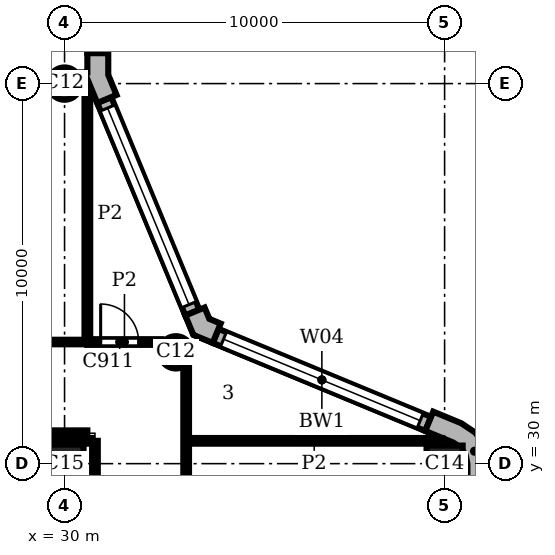
"""IFC4 building model, lengths in metres.
Left out: names, types, materials, properties, quantities, classifications, styles, units other than length and angle.
Written with IfcOpenShell. Run it as: python <this file> out.ifc"""

import sys

from ifc_helpers import new_model, si_unit, direction, frame, frame_2d, origin, origin_2d, place, context, subcontext, project, spatial, polyline, rectangle, circle, outline, extrude, element, fill, save


model = new_model("IFC4")
c1 = context("Model", 3, precision=1e-05, world=origin(), true_north=direction((0.0, 1.0)))
c2 = subcontext(c1, "Body", "Model", "MODEL_VIEW")
j1 = project(units=[si_unit("LENGTHUNIT", "METRE"), si_unit("PLANEANGLEUNIT", "RADIAN")], contexts=[c1])
p1 = place(None, origin())
s1 = spatial("IfcSite", under=j1, at=p1, CompositionType="ELEMENT")
p2 = place(p1, origin())
s2 = spatial("IfcBuilding", under=s1, at=p2, CompositionType="ELEMENT")
p3 = place(p2, frame((0.0, 0.0, 333.3)))
s3 = spatial("IfcBuildingStorey", under=s2, at=p3, CompositionType="ELEMENT", Elevation=333.3)
p4 = place(p3, frame((40.0, 30.0, 0.0), z_axis=(0.0, 0.0, 1.0), x_axis=(1.0, 0.0, 0.0)))
e1 = element("IfcColumn", 1, at=p4, inside=s3, PredefinedType="COLUMN", context=c2, shape_type="SweptSolid", body=[
    extrude(rectangle(XDim=0.95, YDim=0.95, at=origin_2d()), origin(), (0.0, 0.0, 1.0), 3.9),
])
for number, where, z_axis, x_axis in (
    (2, (32.929, 32.929, 0.0), (0.0, 0.0, 1.0), (1.0, 0.0, 0.0)),
    (3, (30.0, 40.0, 0.0), (0.0, 0.0, 1.0), (1.0, 0.0, 0.0)),
):
    element("IfcColumn", number, at=place(p3, frame(where, z_axis=z_axis, x_axis=x_axis)), inside=s3, PredefinedType="COLUMN", context=c2, shape_type="SweptSolid", body=[
        extrude(circle(Radius=0.425, at=origin_2d()), origin(), (0.0, 0.0, 1.0), 3.9),
    ])
p5 = place(p3, frame((30.0, 30.0, 0.0), z_axis=(0.0, 0.0, 1.0), x_axis=(1.0, 0.0, 0.0)))
e4 = element("IfcColumn", 4, at=p5, inside=s3, PredefinedType="COLUMN", context=c2, shape_type="SweptSolid", body=[
    extrude(rectangle(XDim=1.0, YDim=1.0, at=origin_2d()), origin(), (0.0, 0.0, 1.0), 3.9),
])
p6 = place(p3, origin())
e5 = element("IfcWall", 5, at=p6, inside=s3, PredefinedType="SOLIDWALL", context=c2, shape_type="SweptSolid", body=[
    extrude(outline(polyline([(41.0, 29.2), (41.15, 29.2), (41.15, 30.0), (41.062, 30.44), (40.813, 30.813), (40.44, 31.062), (39.701, 31.369), (39.644, 31.23), (39.49, 30.861), (40.229, 30.554), (40.424, 30.424), (40.554, 30.229), (40.6, 30.0), (40.6, 29.2), (41.0, 29.2)])), origin(), (0.0, 0.0, 1.0), 3.9),
])
e6 = element("IfcWall", 6, at=p6, inside=s3, PredefinedType="SOLIDWALL", context=c2, shape_type="SweptSolid", body=[
    extrude(outline(polyline([(34.051, 33.547), (34.108, 33.685), (33.809, 33.809), (33.685, 34.108), (33.547, 34.051), (33.177, 33.898), (33.388, 33.388), (33.898, 33.177), (34.051, 33.547)])), origin(), (0.0, 0.0, 1.0), 3.9),
])
e7 = element("IfcWall", 7, at=p6, inside=s3, PredefinedType="SOLIDWALL", context=c2, shape_type="SweptSolid", body=[
    extrude(outline(polyline([(30.62, 39.995), (30.62, 40.071), (30.861, 39.49), (31.23, 39.644), (31.369, 39.701), (31.15, 40.229), (31.15, 40.8), (31.0, 40.8), (30.6, 40.8), (30.6, 40.295), (30.425, 40.295), (30.425, 39.995), (30.62, 39.995)])), origin(), (0.0, 0.0, 1.0), 3.9),
])
p7 = place(p3, frame((39.567, 31.045, 0.0), z_axis=(0.0, 0.0, 1.0), x_axis=(-0.923891000409, 0.382655745237, 0.0)))
e8 = element("IfcWall", 8, at=p7, inside=s3, PredefinedType="SOLIDWALL", context=c2, shape_type="SweptSolid", body=[
    extrude(rectangle(XDim=6.053, YDim=0.4, at=frame_2d((3.027, 0.0))), origin(), (0.0, 0.0, 1.0), 3.9),
])
p8 = place(p7, frame((0.227, 0.0, 0.9)))
e9 = element("IfcOpeningElement", 9, at=p8, cuts=e8, PredefinedType="OPENING", context=c2, shape_type="SweptSolid", body=[
    extrude(rectangle(XDim=5.6, YDim=2.35, at=frame_2d((2.8, 1.175))), frame((0.0, 0.21, 0.0), z_axis=(0.0, -1.0, 0.0), x_axis=(1.0, 0.0, 0.0)), (0.0, 0.0, 1.0), 0.42),
])
p9 = place(p3, frame((33.362, 33.974, 0.0), z_axis=(0.0, 0.0, 1.0), x_axis=(-0.382655745237, 0.923891000409, 0.0)))
e10 = element("IfcWall", 10, at=p9, inside=s3, PredefinedType="SOLIDWALL", context=c2, shape_type="SweptSolid", body=[
    extrude(rectangle(XDim=6.053, YDim=0.4, at=frame_2d((3.027, 0.0))), origin(), (0.0, 0.0, 1.0), 3.9),
])
p10 = place(p9, frame((0.227, 0.0, 0.9)))
e11 = element("IfcOpeningElement", 11, at=p10, cuts=e10, PredefinedType="OPENING", context=c2, shape_type="SweptSolid", body=[
    extrude(rectangle(XDim=5.6, YDim=2.35, at=frame_2d((2.8, 1.175))), frame((0.0, 0.21, 0.0), z_axis=(0.0, -1.0, 0.0), x_axis=(1.0, 0.0, 0.0)), (0.0, 0.0, 1.0), 0.42),
])
p11 = place(p3, frame((30.8, 40.8, 0.0), z_axis=(0.0, 0.0, 1.0), x_axis=(0.0, 1.0, 0.0)))
e12 = element("IfcWall", 12, at=p11, inside=s3, PredefinedType="SOLIDWALL", context=c2, shape_type="SweptSolid", body=[
    extrude(rectangle(XDim=18.4, YDim=0.4, at=frame_2d((9.2, 0.0))), origin(), (0.0, 0.0, 1.0), 3.9),
])
p12 = place(p11, frame((0.2, 0.0, 0.9)))
e13 = element("IfcOpeningElement", 13, at=p12, cuts=e12, PredefinedType="OPENING", context=c2, shape_type="SweptSolid", body=[
    extrude(rectangle(XDim=8.0, YDim=2.35, at=frame_2d((4.0, 1.175))), frame((0.0, 0.21, 0.0), z_axis=(0.0, -1.0, 0.0), x_axis=(1.0, 0.0, 0.0)), (0.0, 0.0, 1.0), 0.42),
])
p13 = place(p11, frame((10.2, 0.0, 0.9)))
e14 = element("IfcOpeningElement", 14, at=p13, cuts=e12, PredefinedType="OPENING", context=c2, shape_type="SweptSolid", body=[
    extrude(rectangle(XDim=8.0, YDim=2.35, at=frame_2d((4.0, 1.175))), frame((0.0, 0.21, 0.0), z_axis=(0.0, -1.0, 0.0), x_axis=(1.0, 0.0, 0.0)), (0.0, 0.0, 1.0), 0.42),
])
p14 = place(p3, frame((30.6, 33.2, 0.0), z_axis=(0.0, 0.0, 1.0), x_axis=(0.0, 1.0, 0.0)))
e15 = element("IfcWall", 15, at=p14, inside=s3, PredefinedType="PARTITIONING", context=c2, shape_type="SweptSolid", body=[
    extrude(rectangle(XDim=6.738, YDim=0.15, at=frame_2d((3.369, 0.0))), origin(), (0.0, 0.0, 1.0), 3.58),
])
p15 = place(p3, frame((30.8, 15.45, 0.0), z_axis=(0.0, 0.0, 1.0), x_axis=(0.0, 1.0, 0.0)))
e16 = element("IfcWall", 16, at=p15, inside=s3, PredefinedType="PARTITIONING", context=c2, shape_type="SweptSolid", body=[
    extrude(rectangle(XDim=15.15, YDim=0.15, at=frame_2d((7.575, 0.0))), origin(), (0.0, 0.0, 1.0), 3.58),
])
p16 = place(p15, frame((2.35, 0.0, 0.0)))
e17 = element("IfcOpeningElement", 17, at=p16, cuts=e16, PredefinedType="OPENING", context=c2, shape_type="SweptSolid", body=[
    extrude(rectangle(XDim=1.0, YDim=2.1, at=frame_2d((0.5, 1.05))), frame((0.0, 0.085, 0.0), z_axis=(0.0, -1.0, 0.0), x_axis=(1.0, 0.0, 0.0)), (0.0, 0.0, 1.0), 0.17),
])
p17 = place(p15, frame((10.35, 0.0, 0.0)))
e18 = element("IfcOpeningElement", 18, at=p17, cuts=e16, PredefinedType="OPENING", context=c2, shape_type="SweptSolid", body=[
    extrude(rectangle(XDim=1.0, YDim=2.1, at=frame_2d((0.5, 1.05))), frame((0.0, 0.085, 0.0), z_axis=(0.0, -1.0, 0.0), x_axis=(1.0, 0.0, 0.0)), (0.0, 0.0, 1.0), 0.17),
])
p18 = place(p3, frame((33.2, 8.0, 0.0), z_axis=(0.0, 0.0, 1.0), x_axis=(0.0, 1.0, 0.0)))
e19 = element("IfcWall", 19, at=p18, inside=s3, PredefinedType="PARTITIONING", context=c2, shape_type="SweptSolid", body=[
    extrude(rectangle(XDim=24.552, YDim=0.15, at=frame_2d((12.276, 0.0))), origin(), (0.0, 0.0, 1.0), 3.58),
])
p19 = place(p3, frame((28.002, 30.6, 0.0), z_axis=(0.0, 0.0, 1.0), x_axis=(1.0, 0.0, 0.0)))
e20 = element("IfcWall", 20, at=p19, inside=s3, PredefinedType="PARTITIONING", context=c2, shape_type="SweptSolid", body=[
    extrude(rectangle(XDim=2.723, YDim=0.15, at=frame_2d((1.362, 0.0))), origin(), (0.0, 0.0, 1.0), 3.58),
])
p20 = place(p3, frame((33.2, 30.6, 0.0), z_axis=(0.0, 0.0, 1.0), x_axis=(1.0, 0.0, 0.0)))
e21 = element("IfcWall", 21, at=p20, inside=s3, PredefinedType="PARTITIONING", context=c2, shape_type="SweptSolid", body=[
    extrude(rectangle(XDim=6.738, YDim=0.15, at=frame_2d((3.369, 0.0))), origin(), (0.0, 0.0, 1.0), 3.58),
])
p21 = place(p3, frame((13.802, 30.8, 0.0), z_axis=(0.0, 0.0, 1.0), x_axis=(1.0, 0.0, 0.0)))
e22 = element("IfcWall", 22, at=p21, inside=s3, PredefinedType="PARTITIONING", context=c2, shape_type="SweptSolid", body=[
    extrude(rectangle(XDim=16.798, YDim=0.15, at=frame_2d((8.399, 0.0))), origin(), (0.0, 0.0, 1.0), 3.58),
])
p22 = place(p21, frame((7.85, 0.0, 0.0)))
e23 = element("IfcOpeningElement", 23, at=p22, cuts=e22, PredefinedType="OPENING", context=c2, shape_type="SweptSolid", body=[
    extrude(rectangle(XDim=1.0, YDim=2.1, at=frame_2d((0.5, 1.05))), frame((0.0, 0.085, 0.0), z_axis=(0.0, -1.0, 0.0), x_axis=(1.0, 0.0, 0.0)), (0.0, 0.0, 1.0), 0.17),
])
p23 = place(p3, frame((30.6, 33.2, 0.0), z_axis=(0.0, 0.0, 1.0), x_axis=(1.0, 0.0, 0.0)))
e24 = element("IfcWall", 24, at=p23, inside=s3, PredefinedType="PARTITIONING", context=c2, shape_type="SweptSolid", body=[
    extrude(rectangle(XDim=1.952, YDim=0.15, at=frame_2d((0.976, 0.0))), origin(), (0.0, 0.0, 1.0), 3.58),
])
p24 = place(p23, frame((0.35, 0.0, 0.0)))
e25 = element("IfcOpeningElement", 25, at=p24, cuts=e24, PredefinedType="OPENING", context=c2, shape_type="SweptSolid", body=[
    extrude(rectangle(XDim=1.0, YDim=2.1, at=frame_2d((0.5, 1.05))), frame((0.0, 0.085, 0.0), z_axis=(0.0, -1.0, 0.0), x_axis=(1.0, 0.0, 0.0)), (0.0, 0.0, 1.0), 0.17),
])
p25 = place(p3, frame((20.2, 33.2, 0.0), z_axis=(0.0, 0.0, 1.0), x_axis=(1.0, 0.0, 0.0)))
e26 = element("IfcWall", 26, at=p25, inside=s3, PredefinedType="PARTITIONING", context=c2, shape_type="SweptSolid", body=[
    extrude(rectangle(XDim=10.4, YDim=0.12, at=frame_2d((5.2, 0.0))), origin(), (0.0, 0.0, 1.0), 3.58),
])
p26 = place(p25, frame((4.6, 0.0, 0.0)))
e27 = element("IfcOpeningElement", 27, at=p26, cuts=e26, PredefinedType="OPENING", context=c2, shape_type="SweptSolid", body=[
    extrude(rectangle(XDim=1.8, YDim=2.1, at=frame_2d((0.9, 1.05))), frame((0.0, 0.07, 0.0), z_axis=(0.0, -1.0, 0.0), x_axis=(1.0, 0.0, 0.0)), (0.0, 0.0, 1.0), 0.14),
])
p27 = place(p8, origin())
e28 = element("IfcWindow", 28, at=p27, inside=s3, PartitioningType="SINGLE_PANEL", PredefinedType="WINDOW", context=c2, shape_type="SweptSolid", body=[
    extrude(rectangle(XDim=5.6, YDim=2.35, at=frame_2d((2.8, 1.175))), frame((0.0, 0.16, 0.0), z_axis=(0.0, -1.0, 0.0), x_axis=(1.0, 0.0, 0.0)), (0.0, 0.0, 1.0), 0.06),
])
fill(e9, e28)
p28 = place(p10, origin())
e29 = element("IfcWindow", 29, at=p28, inside=s3, PartitioningType="SINGLE_PANEL", PredefinedType="WINDOW", context=c2, shape_type="SweptSolid", body=[
    extrude(rectangle(XDim=5.6, YDim=2.35, at=frame_2d((2.8, 1.175))), frame((0.0, 0.16, 0.0), z_axis=(0.0, -1.0, 0.0), x_axis=(1.0, 0.0, 0.0)), (0.0, 0.0, 1.0), 0.06),
])
fill(e11, e29)
p29 = place(p24, origin())
e30 = element("IfcDoor", 30, at=p29, inside=s3, OperationType="SINGLE_SWING_LEFT", PredefinedType="DOOR", context=c2, shape_type="SweptSolid", body=[
    extrude(rectangle(XDim=1.0, YDim=2.1, at=frame_2d((0.5, 1.05))), frame((0.0, 0.025, 0.0), z_axis=(0.0, -1.0, 0.0), x_axis=(1.0, 0.0, 0.0)), (0.0, 0.0, 1.0), 0.05),
])
fill(e25, e30)
save(model, sys.argv[1])
